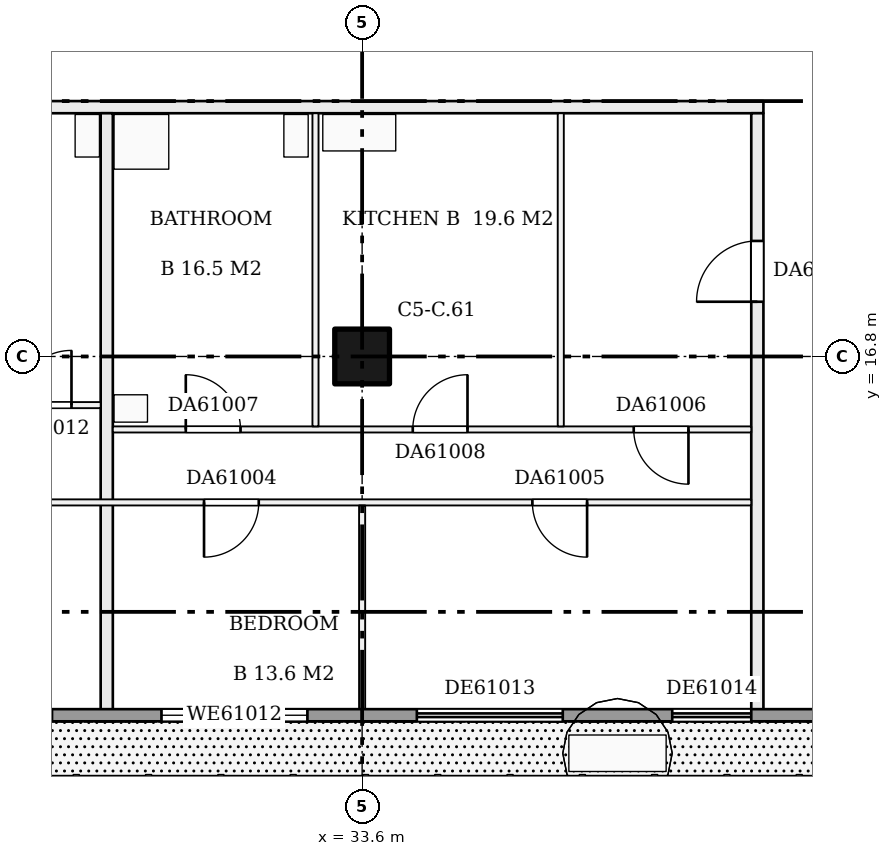
"""IFC4 building model, lengths in metres.
Left out: names, types, materials, properties, quantities, classifications, styles, units other than length and angle.
Written with IfcOpenShell. Run it as: python <this file> out.ifc"""

import sys

from ifc_helpers import new_model, si_unit, direction, frame, frame_2d, origin, origin_2d, place, context, subcontext, project, spatial, rectangle, extrude, element, fill, save


model = new_model("IFC4")
c1 = context("Model", 3, precision=1e-05, world=origin(), true_north=direction((0.0, 1.0)))
c2 = subcontext(c1, "Body", "Model", "MODEL_VIEW")
j1 = project(units=[si_unit("LENGTHUNIT", "METRE"), si_unit("PLANEANGLEUNIT", "RADIAN")], contexts=[c1])
p1 = place(None, origin())
s1 = spatial("IfcSite", under=j1, at=p1, CompositionType="ELEMENT")
p2 = place(p1, origin())
s2 = spatial("IfcBuilding", under=s1, at=p2, CompositionType="ELEMENT")
p3 = place(p2, frame((0.0, 0.0, 235.2)))
s3 = spatial("IfcBuildingStorey", under=s2, at=p3, CompositionType="ELEMENT", Elevation=235.2)
p4 = place(p3, frame((33.6, 16.8, 0.0), z_axis=(0.0, 0.0, 1.0), x_axis=(1.0, 0.0, 0.0)))
e1 = element("IfcColumn", 1, at=p4, inside=s3, PredefinedType="COLUMN", context=c2, shape_type="SweptSolid", body=[
    extrude(rectangle(XDim=0.9, YDim=0.9, at=origin_2d()), origin(), (0.0, 0.0, 1.0), 3.22),
])
p5 = place(p3, frame((21.1, 14.4, 0.0), z_axis=(0.0, 0.0, 1.0), x_axis=(1.0, 0.0, 0.0)))
e2 = element("IfcWall", 2, at=p5, inside=s3, PredefinedType="PARTITIONING", context=c2, shape_type="SweptSolid", body=[
    extrude(rectangle(XDim=18.9, YDim=0.1, at=frame_2d((9.45, 0.0))), origin(), (0.0, 0.0, 1.0), 3.22),
])
p6 = place(p5, frame((1.6, 0.0, 0.0)))
e3 = element("IfcOpeningElement", 3, at=p6, cuts=e2, PredefinedType="OPENING", context=c2, shape_type="SweptSolid", body=[
    extrude(rectangle(XDim=0.9, YDim=2.1, at=frame_2d((0.45, 1.05))), frame((0.0, 0.06, 0.0), z_axis=(0.0, -1.0, 0.0), x_axis=(1.0, 0.0, 0.0)), (0.0, 0.0, 1.0), 0.12),
])
p7 = place(p5, frame((5.7, 0.0, 0.0)))
e4 = element("IfcOpeningElement", 4, at=p7, cuts=e2, PredefinedType="OPENING", context=c2, shape_type="SweptSolid", body=[
    extrude(rectangle(XDim=0.9, YDim=2.1, at=frame_2d((0.45, 1.05))), frame((0.0, 0.06, 0.0), z_axis=(0.0, -1.0, 0.0), x_axis=(1.0, 0.0, 0.0)), (0.0, 0.0, 1.0), 0.12),
])
p8 = place(p5, frame((9.9, 0.0, 0.0)))
e5 = element("IfcOpeningElement", 5, at=p8, cuts=e2, PredefinedType="OPENING", context=c2, shape_type="SweptSolid", body=[
    extrude(rectangle(XDim=0.9, YDim=2.1, at=frame_2d((0.45, 1.05))), frame((0.0, 0.06, 0.0), z_axis=(0.0, -1.0, 0.0), x_axis=(1.0, 0.0, 0.0)), (0.0, 0.0, 1.0), 0.12),
])
p9 = place(p5, frame((15.3, 0.0, 0.0)))
e6 = element("IfcOpeningElement", 6, at=p9, cuts=e2, PredefinedType="OPENING", context=c2, shape_type="SweptSolid", body=[
    extrude(rectangle(XDim=0.9, YDim=2.1, at=frame_2d((0.45, 1.05))), frame((0.0, 0.06, 0.0), z_axis=(0.0, -1.0, 0.0), x_axis=(1.0, 0.0, 0.0)), (0.0, 0.0, 1.0), 0.12),
])
p10 = place(p3, frame((29.5, 15.6, 0.0), z_axis=(0.0, 0.0, 1.0), x_axis=(1.0, 0.0, 0.0)))
e7 = element("IfcWall", 7, at=p10, inside=s3, PredefinedType="PARTITIONING", context=c2, shape_type="SweptSolid", body=[
    extrude(rectangle(XDim=10.5, YDim=0.1, at=frame_2d((5.25, 0.0))), origin(), (0.0, 0.0, 1.0), 3.22),
])
p11 = place(p10, frame((8.567, 0.0, 0.0)))
e8 = element("IfcOpeningElement", 8, at=p11, cuts=e7, PredefinedType="OPENING", context=c2, shape_type="SweptSolid", body=[
    extrude(rectangle(XDim=0.9, YDim=2.1, at=frame_2d((0.45, 1.05))), frame((0.0, 0.06, 0.0), z_axis=(0.0, -1.0, 0.0), x_axis=(1.0, 0.0, 0.0)), (0.0, 0.0, 1.0), 0.12),
])
p12 = place(p10, frame((1.2, 0.0, 0.0)))
e9 = element("IfcOpeningElement", 9, at=p12, cuts=e7, PredefinedType="OPENING", context=c2, shape_type="SweptSolid", body=[
    extrude(rectangle(XDim=0.9, YDim=2.1, at=frame_2d((0.45, 1.05))), frame((0.0, 0.06, 0.0), z_axis=(0.0, -1.0, 0.0), x_axis=(1.0, 0.0, 0.0)), (0.0, 0.0, 1.0), 0.12),
])
p13 = place(p10, frame((4.933, 0.0, 0.0)))
e10 = element("IfcOpeningElement", 10, at=p13, cuts=e7, PredefinedType="OPENING", context=c2, shape_type="SweptSolid", body=[
    extrude(rectangle(XDim=0.9, YDim=2.1, at=frame_2d((0.45, 1.05))), frame((0.0, 0.06, 0.0), z_axis=(0.0, -1.0, 0.0), x_axis=(1.0, 0.0, 0.0)), (0.0, 0.0, 1.0), 0.12),
])
p14 = place(p3, frame((21.1, 16.0, 0.0), z_axis=(0.0, 0.0, 1.0), x_axis=(1.0, 0.0, 0.0)))
e11 = element("IfcWall", 11, at=p14, inside=s3, PredefinedType="PARTITIONING", context=c2, shape_type="SweptSolid", body=[
    extrude(rectangle(XDim=8.2, YDim=0.1, at=frame_2d((4.1, 0.0))), origin(), (0.0, 0.0, 1.0), 3.22),
])
p15 = place(p14, frame((2.38, 0.0, 0.0)))
e12 = element("IfcOpeningElement", 12, at=p15, cuts=e11, PredefinedType="OPENING", context=c2, shape_type="SweptSolid", body=[
    extrude(rectangle(XDim=0.9, YDim=2.1, at=frame_2d((0.45, 1.05))), frame((0.0, 0.06, 0.0), z_axis=(0.0, -1.0, 0.0), x_axis=(1.0, 0.0, 0.0)), (0.0, 0.0, 1.0), 0.12),
])
p16 = place(p14, frame((0.5, 0.0, 0.0)))
e13 = element("IfcOpeningElement", 13, at=p16, cuts=e11, PredefinedType="OPENING", context=c2, shape_type="SweptSolid", body=[
    extrude(rectangle(XDim=0.9, YDim=2.1, at=frame_2d((0.45, 1.05))), frame((0.0, 0.06, 0.0), z_axis=(0.0, -1.0, 0.0), x_axis=(1.0, 0.0, 0.0)), (0.0, 0.0, 1.0), 0.12),
])
p17 = place(p14, frame((4.8, 0.0, 0.0)))
e14 = element("IfcOpeningElement", 14, at=p17, cuts=e11, PredefinedType="OPENING", context=c2, shape_type="SweptSolid", body=[
    extrude(rectangle(XDim=0.9, YDim=2.1, at=frame_2d((0.45, 1.05))), frame((0.0, 0.06, 0.0), z_axis=(0.0, -1.0, 0.0), x_axis=(1.0, 0.0, 0.0)), (0.0, 0.0, 1.0), 0.12),
])
p18 = place(p14, frame((6.82, 0.0, 0.0)))
e15 = element("IfcOpeningElement", 15, at=p18, cuts=e11, PredefinedType="OPENING", context=c2, shape_type="SweptSolid", body=[
    extrude(rectangle(XDim=0.9, YDim=2.1, at=frame_2d((0.45, 1.05))), frame((0.0, 0.06, 0.0), z_axis=(0.0, -1.0, 0.0), x_axis=(1.0, 0.0, 0.0)), (0.0, 0.0, 1.0), 0.12),
])
p19 = place(p3, frame((20.9, 20.9, 0.0), z_axis=(0.0, 0.0, 1.0), x_axis=(1.0, 0.0, 0.0)))
e16 = element("IfcWall", 16, at=p19, inside=s3, PredefinedType="PARTITIONING", context=c2, shape_type="SweptSolid", body=[
    extrude(rectangle(XDim=19.3, YDim=0.2, at=frame_2d((9.65, 0.0))), origin(), (0.0, 0.0, 1.0), 3.22),
])
p20 = place(p19, frame((2.58, 0.0, 0.0)))
e17 = element("IfcOpeningElement", 17, at=p20, cuts=e16, PredefinedType="OPENING", context=c2, shape_type="SweptSolid", body=[
    extrude(rectangle(XDim=1.0, YDim=2.1, at=frame_2d((0.5, 1.05))), frame((0.0, 0.11, 0.0), z_axis=(0.0, -1.0, 0.0), x_axis=(1.0, 0.0, 0.0)), (0.0, 0.0, 1.0), 0.22),
])
p21 = place(p3, frame((29.4, 10.9, 0.0), z_axis=(0.0, 0.0, 1.0), x_axis=(0.0, 1.0, 0.0)))
e18 = element("IfcWall", 18, at=p21, inside=s3, PredefinedType="PARTITIONING", context=c2, shape_type="SweptSolid", body=[
    extrude(rectangle(XDim=9.9, YDim=0.2, at=frame_2d((4.95, 0.0))), origin(), (0.0, 0.0, 1.0), 3.22),
])
p22 = place(p3, frame((32.833, 15.65, 0.0), z_axis=(0.0, 0.0, 1.0), x_axis=(0.0, 1.0, 0.0)))
e19 = element("IfcWall", 19, at=p22, inside=s3, PredefinedType="PARTITIONING", context=c2, shape_type="SweptSolid", body=[
    extrude(rectangle(XDim=5.15, YDim=0.1, at=frame_2d((2.575, 0.0))), origin(), (0.0, 0.0, 1.0), 3.22),
])
p23 = place(p3, frame((33.6, 10.9, 0.0), z_axis=(0.0, 0.0, 1.0), x_axis=(0.0, 1.0, 0.0)))
e20 = element("IfcWall", 20, at=p23, inside=s3, PredefinedType="PARTITIONING", context=c2, shape_type="SweptSolid", body=[
    extrude(rectangle(XDim=3.45, YDim=0.1, at=frame_2d((1.725, 0.0))), origin(), (0.0, 0.0, 1.0), 3.22),
])
p24 = place(p3, frame((36.867, 15.65, 0.0), z_axis=(0.0, 0.0, 1.0), x_axis=(0.0, 1.0, 0.0)))
e21 = element("IfcWall", 21, at=p24, inside=s3, PredefinedType="PARTITIONING", context=c2, shape_type="SweptSolid", body=[
    extrude(rectangle(XDim=5.15, YDim=0.1, at=frame_2d((2.575, 0.0))), origin(), (0.0, 0.0, 1.0), 3.22),
])
p25 = place(p3, frame((40.1, 10.9, 0.0), z_axis=(0.0, 0.0, 1.0), x_axis=(0.0, 1.0, 0.0)))
e22 = element("IfcWall", 22, at=p25, inside=s3, PredefinedType="PARTITIONING", context=c2, shape_type="SweptSolid", body=[
    extrude(rectangle(XDim=9.9, YDim=0.2, at=frame_2d((4.95, 0.0))), origin(), (0.0, 0.0, 1.0), 3.22),
])
p26 = place(p25, frame((6.8, 0.0, 0.0)))
e23 = element("IfcOpeningElement", 23, at=p26, cuts=e22, PredefinedType="OPENING", context=c2, shape_type="SweptSolid", body=[
    extrude(rectangle(XDim=1.0, YDim=2.1, at=frame_2d((0.5, 1.05))), frame((0.0, 0.11, 0.0), z_axis=(0.0, -1.0, 0.0), x_axis=(1.0, 0.0, 0.0)), (0.0, 0.0, 1.0), 0.22),
])
p27 = place(p3, frame((13.2, 10.9, 0.0), z_axis=(0.0, 0.0, 1.0), x_axis=(1.0, 0.0, 0.0)))
e24 = element("IfcWall", 24, at=p27, inside=s3, PredefinedType="SOLIDWALL", context=c2, shape_type="SweptSolid", body=[
    extrude(rectangle(XDim=28.8, YDim=0.2, at=frame_2d((14.4, 0.0))), origin(), (0.0, 0.0, 1.0), 3.22),
])
p28 = place(p27, frame((0.3, 0.0, 0.0)))
e25 = element("IfcOpeningElement", 25, at=p28, cuts=e24, PredefinedType="OPENING", context=c2, shape_type="SweptSolid", body=[
    extrude(rectangle(XDim=2.4, YDim=2.2, at=frame_2d((1.2, 1.1))), frame((0.0, 0.11, 0.0), z_axis=(0.0, -1.0, 0.0), x_axis=(1.0, 0.0, 0.0)), (0.0, 0.0, 1.0), 0.22),
])
p29 = place(p27, frame((4.5, 0.0, 0.0)))
e26 = element("IfcOpeningElement", 26, at=p29, cuts=e24, PredefinedType="OPENING", context=c2, shape_type="SweptSolid", body=[
    extrude(rectangle(XDim=2.4, YDim=2.2, at=frame_2d((1.2, 1.1))), frame((0.0, 0.11, 0.0), z_axis=(0.0, -1.0, 0.0), x_axis=(1.0, 0.0, 0.0)), (0.0, 0.0, 1.0), 0.22),
])
p30 = place(p27, frame((8.7, 0.0, 0.9)))
e27 = element("IfcOpeningElement", 27, at=p30, cuts=e24, PredefinedType="OPENING", context=c2, shape_type="SweptSolid", body=[
    extrude(rectangle(XDim=2.4, YDim=1.5, at=frame_2d((1.2, 0.75))), frame((0.0, 0.11, 0.0), z_axis=(0.0, -1.0, 0.0), x_axis=(1.0, 0.0, 0.0)), (0.0, 0.0, 1.0), 0.22),
])
p31 = place(p27, frame((12.9, 0.0, 0.9)))
e28 = element("IfcOpeningElement", 28, at=p31, cuts=e24, PredefinedType="OPENING", context=c2, shape_type="SweptSolid", body=[
    extrude(rectangle(XDim=2.4, YDim=1.5, at=frame_2d((1.2, 0.75))), frame((0.0, 0.11, 0.0), z_axis=(0.0, -1.0, 0.0), x_axis=(1.0, 0.0, 0.0)), (0.0, 0.0, 1.0), 0.22),
])
p32 = place(p27, frame((17.1, 0.0, 0.9)))
e29 = element("IfcOpeningElement", 29, at=p32, cuts=e24, PredefinedType="OPENING", context=c2, shape_type="SweptSolid", body=[
    extrude(rectangle(XDim=2.4, YDim=1.5, at=frame_2d((1.2, 0.75))), frame((0.0, 0.11, 0.0), z_axis=(0.0, -1.0, 0.0), x_axis=(1.0, 0.0, 0.0)), (0.0, 0.0, 1.0), 0.22),
])
p33 = place(p27, frame((21.3, 0.0, 0.0)))
e30 = element("IfcOpeningElement", 30, at=p33, cuts=e24, PredefinedType="OPENING", context=c2, shape_type="SweptSolid", body=[
    extrude(rectangle(XDim=2.4, YDim=2.2, at=frame_2d((1.2, 1.1))), frame((0.0, 0.11, 0.0), z_axis=(0.0, -1.0, 0.0), x_axis=(1.0, 0.0, 0.0)), (0.0, 0.0, 1.0), 0.22),
])
p34 = place(p27, frame((25.5, 0.0, 0.0)))
e31 = element("IfcOpeningElement", 31, at=p34, cuts=e24, PredefinedType="OPENING", context=c2, shape_type="SweptSolid", body=[
    extrude(rectangle(XDim=1.3, YDim=2.2, at=frame_2d((0.65, 1.1))), frame((0.0, 0.11, 0.0), z_axis=(0.0, -1.0, 0.0), x_axis=(1.0, 0.0, 0.0)), (0.0, 0.0, 1.0), 0.22),
])
p35 = place(p8, frame((0.9, 0.0, 0.0), z_axis=(0.0, 0.0, 1.0), x_axis=(-1.0, 0.0, 0.0)))
e32 = element("IfcDoor", 32, at=p35, inside=s3, OperationType="SINGLE_SWING_RIGHT", PredefinedType="DOOR", context=c2, shape_type="SweptSolid", body=[
    extrude(rectangle(XDim=0.9, YDim=2.1, at=frame_2d((0.45, 1.05))), frame((0.0, 0.025, 0.0), z_axis=(0.0, -1.0, 0.0), x_axis=(1.0, 0.0, 0.0)), (0.0, 0.0, 1.0), 0.05),
])
fill(e5, e32)
p36 = place(p9, frame((0.9, 0.0, 0.0), z_axis=(0.0, 0.0, 1.0), x_axis=(-1.0, 0.0, 0.0)))
e33 = element("IfcDoor", 33, at=p36, inside=s3, OperationType="SINGLE_SWING_LEFT", PredefinedType="DOOR", context=c2, shape_type="SweptSolid", body=[
    extrude(rectangle(XDim=0.9, YDim=2.1, at=frame_2d((0.45, 1.05))), frame((0.0, 0.025, 0.0), z_axis=(0.0, -1.0, 0.0), x_axis=(1.0, 0.0, 0.0)), (0.0, 0.0, 1.0), 0.05),
])
fill(e6, e33)
p37 = place(p11, frame((0.9, 0.0, 0.0), z_axis=(0.0, 0.0, 1.0), x_axis=(-1.0, 0.0, 0.0)))
e34 = element("IfcDoor", 34, at=p37, inside=s3, OperationType="SINGLE_SWING_LEFT", PredefinedType="DOOR", context=c2, shape_type="SweptSolid", body=[
    extrude(rectangle(XDim=0.9, YDim=2.1, at=frame_2d((0.45, 1.05))), frame((0.0, 0.025, 0.0), z_axis=(0.0, -1.0, 0.0), x_axis=(1.0, 0.0, 0.0)), (0.0, 0.0, 1.0), 0.05),
])
fill(e8, e34)
p38 = place(p12, origin())
e35 = element("IfcDoor", 35, at=p38, inside=s3, OperationType="SINGLE_SWING_LEFT", PredefinedType="DOOR", context=c2, shape_type="SweptSolid", body=[
    extrude(rectangle(XDim=0.9, YDim=2.1, at=frame_2d((0.45, 1.05))), frame((0.0, 0.025, 0.0), z_axis=(0.0, -1.0, 0.0), x_axis=(1.0, 0.0, 0.0)), (0.0, 0.0, 1.0), 0.05),
])
fill(e9, e35)
p39 = place(p13, origin())
e36 = element("IfcDoor", 36, at=p39, inside=s3, OperationType="SINGLE_SWING_RIGHT", PredefinedType="DOOR", context=c2, shape_type="SweptSolid", body=[
    extrude(rectangle(XDim=0.9, YDim=2.1, at=frame_2d((0.45, 1.05))), frame((0.0, 0.025, 0.0), z_axis=(0.0, -1.0, 0.0), x_axis=(1.0, 0.0, 0.0)), (0.0, 0.0, 1.0), 0.05),
])
fill(e10, e36)
p40 = place(p18, origin())
e37 = element("IfcDoor", 37, at=p40, inside=s3, OperationType="SINGLE_SWING_RIGHT", PredefinedType="DOOR", context=c2, shape_type="SweptSolid", body=[
    extrude(rectangle(XDim=0.9, YDim=2.1, at=frame_2d((0.45, 1.05))), frame((0.0, 0.025, 0.0), z_axis=(0.0, -1.0, 0.0), x_axis=(1.0, 0.0, 0.0)), (0.0, 0.0, 1.0), 0.05),
])
fill(e15, e37)
p41 = place(p26, origin())
e38 = element("IfcDoor", 38, at=p41, inside=s3, OperationType="SINGLE_SWING_LEFT", PredefinedType="DOOR", context=c2, shape_type="SweptSolid", body=[
    extrude(rectangle(XDim=1.0, YDim=2.1, at=frame_2d((0.5, 1.05))), frame((0.0, 0.025, 0.0), z_axis=(0.0, -1.0, 0.0), x_axis=(1.0, 0.0, 0.0)), (0.0, 0.0, 1.0), 0.05),
])
fill(e23, e38)
p42 = place(p32, origin())
e39 = element("IfcWindow", 39, at=p42, inside=s3, PartitioningType="SINGLE_PANEL", PredefinedType="WINDOW", context=c2, shape_type="SweptSolid", body=[
    extrude(rectangle(XDim=2.4, YDim=1.5, at=frame_2d((1.2, 0.75))), frame((0.0, 0.03, 0.0), z_axis=(0.0, -1.0, 0.0), x_axis=(1.0, 0.0, 0.0)), (0.0, 0.0, 1.0), 0.06),
])
fill(e29, e39)
p43 = place(p33, origin())
e40 = element("IfcDoor", 40, at=p43, inside=s3, OperationType="DOUBLE_DOOR_SLIDING", PredefinedType="DOOR", context=c2, shape_type="SweptSolid", body=[
    extrude(rectangle(XDim=2.4, YDim=2.2, at=frame_2d((1.2, 1.1))), frame((0.0, 0.025, 0.0), z_axis=(0.0, -1.0, 0.0), x_axis=(1.0, 0.0, 0.0)), (0.0, 0.0, 1.0), 0.05),
])
fill(e30, e40)
p44 = place(p34, origin())
e41 = element("IfcDoor", 41, at=p44, inside=s3, OperationType="DOUBLE_DOOR_SLIDING", PredefinedType="DOOR", context=c2, shape_type="SweptSolid", body=[
    extrude(rectangle(XDim=1.3, YDim=2.2, at=frame_2d((0.65, 1.1))), frame((0.0, 0.025, 0.0), z_axis=(0.0, -1.0, 0.0), x_axis=(1.0, 0.0, 0.0)), (0.0, 0.0, 1.0), 0.05),
])
fill(e31, e41)
save(model, sys.argv[1])
